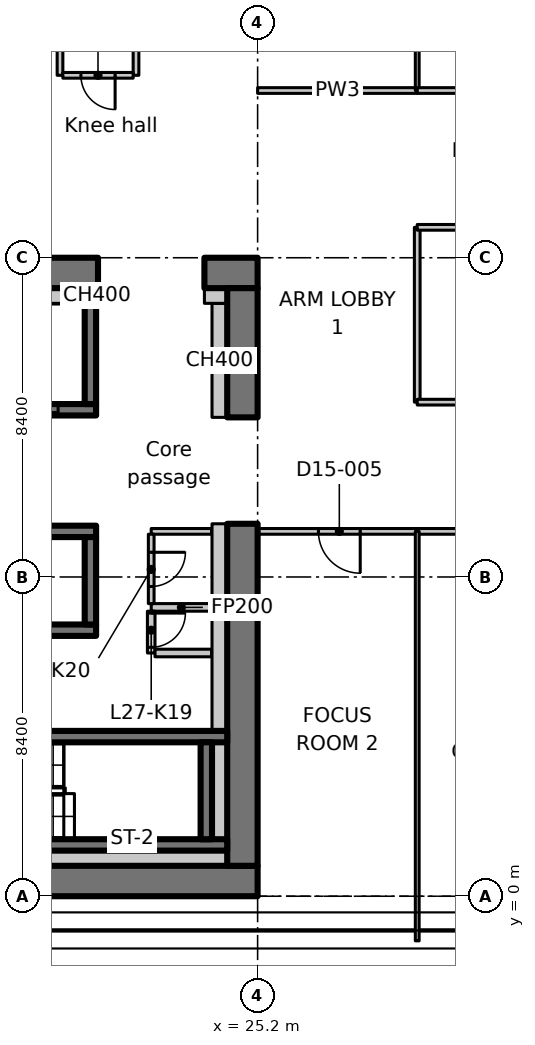
"""IFC4 building model, lengths in metres.
Left out: names, types, materials, properties, quantities, classifications, styles, units other than length and angle.
Written with IfcOpenShell. Run it as: python <this file> out.ifc"""

import sys

from ifc_helpers import new_model, si_unit, direction, frame, frame_2d, origin, place, context, subcontext, project, spatial, polyline, rectangle, outline, extrude, element, fill, save


model = new_model("IFC4")
c1 = context("Model", 3, precision=1e-05, world=origin(), true_north=direction((0.0, 1.0)))
c2 = subcontext(c1, "Body", "Model", "MODEL_VIEW")
j1 = project(units=[si_unit("LENGTHUNIT", "METRE"), si_unit("PLANEANGLEUNIT", "RADIAN")], contexts=[c1])
p1 = place(None, origin())
s1 = spatial("IfcSite", under=j1, at=p1, CompositionType="ELEMENT")
p2 = place(p1, origin())
s2 = spatial("IfcBuilding", under=s1, at=p2, CompositionType="ELEMENT")
p3 = place(p2, frame((0.0, 0.0, 113.3)))
s3 = spatial("IfcBuildingStorey", under=s2, at=p3, CompositionType="ELEMENT", Elevation=113.3)
p4 = place(p3, frame((7.136, 0.4, 0.0), z_axis=(0.0, 0.0, 1.0), x_axis=(1.0, 0.0, 0.0)))
e1 = element("IfcWall", 1, at=p4, inside=s3, PredefinedType="SHEAR", context=c2, shape_type="SweptSolid", body=[
    extrude(rectangle(XDim=18.063, YDim=0.8, at=frame_2d((9.032, 0.0))), origin(), (0.0, 0.0, 1.0), 3.35),
])
p5 = place(p3, frame((-1.1, 16.4, 0.0), z_axis=(0.0, 0.0, 1.0), x_axis=(1.0, 0.0, 0.0)))
e2 = element("IfcWall", 2, at=p5, inside=s3, PredefinedType="SHEAR", context=c2, shape_type="SweptSolid", body=[
    extrude(rectangle(XDim=22.1, YDim=0.8, at=frame_2d((11.05, 0.0))), origin(), (0.0, 0.0, 1.0), 3.35),
])
p6 = place(p5, frame((3.15, 0.0, 0.0)))
e3 = element("IfcOpeningElement", 3, at=p6, cuts=e2, PredefinedType="OPENING", context=c2, shape_type="SweptSolid", body=[
    extrude(rectangle(XDim=1.1, YDim=2.3, at=frame_2d((0.55, 1.15))), frame((0.0, 0.41, 0.0), z_axis=(0.0, -1.0, 0.0), x_axis=(1.0, 0.0, 0.0)), (0.0, 0.0, 1.0), 0.82),
])
p7 = place(p3, frame((23.8, 16.4, 0.0), z_axis=(0.0, 0.0, 1.0), x_axis=(1.0, 0.0, 0.0)))
e4 = element("IfcWall", 4, at=p7, inside=s3, PredefinedType="SHEAR", context=c2, shape_type="SweptSolid", body=[
    extrude(rectangle(XDim=1.4, YDim=0.8, at=frame_2d((0.7, 0.0))), origin(), (0.0, 0.0, 1.0), 3.35),
])
p8 = place(p3, frame((24.8, 0.8, 0.0), z_axis=(0.0, 0.0, 1.0), x_axis=(0.0, 1.0, 0.0)))
e5 = element("IfcWall", 5, at=p8, inside=s3, PredefinedType="SHEAR", context=c2, shape_type="SweptSolid", body=[
    extrude(rectangle(XDim=9.0, YDim=0.8, at=frame_2d((4.5, 0.0))), origin(), (0.0, 0.0, 1.0), 3.35),
])
p9 = place(p3, frame((24.8, 12.6, 0.0), z_axis=(0.0, 0.0, 1.0), x_axis=(0.0, 1.0, 0.0)))
e6 = element("IfcWall", 6, at=p9, inside=s3, PredefinedType="SHEAR", context=c2, shape_type="SweptSolid", body=[
    extrude(rectangle(XDim=3.4, YDim=0.8, at=frame_2d((1.7, 0.0))), origin(), (0.0, 0.0, 1.0), 3.35),
])
p10 = place(p3, frame((24.2, 12.6, 0.0), z_axis=(0.0, 0.0, 1.0), x_axis=(0.0, 1.0, 0.0)))
e7 = element("IfcWall", 7, at=p10, inside=s3, PredefinedType="PARTITIONING", context=c2, shape_type="SweptSolid", body=[
    extrude(rectangle(XDim=3.0, YDim=0.4, at=frame_2d((1.5, 0.0))), origin(), (0.0, 0.0, 1.0), 3.35),
])
p11 = place(p3, frame((23.8, 15.8, 0.0), z_axis=(0.0, 0.0, 1.0), x_axis=(1.0, 0.0, 0.0)))
e8 = element("IfcWall", 8, at=p11, inside=s3, PredefinedType="PARTITIONING", context=c2, shape_type="SweptSolid", body=[
    extrude(rectangle(XDim=0.6, YDim=0.4, at=frame_2d((0.3, 0.0))), origin(), (0.0, 0.0, 1.0), 3.35),
])
p12 = place(p3, frame((0.8, 7.0, 0.0), z_axis=(0.0, 0.0, 1.0), x_axis=(1.0, 0.0, 0.0)))
e9 = element("IfcWall", 9, at=p12, inside=s3, PredefinedType="SHEAR", context=c2, shape_type="SweptSolid", body=[
    extrude(rectangle(XDim=20.15, YDim=0.3, at=frame_2d((10.075, 0.0))), origin(), (0.0, 0.0, 1.0), 3.35),
])
p13 = place(p3, frame((0.8, 9.6, 0.0), z_axis=(0.0, 0.0, 1.0), x_axis=(1.0, 0.0, 0.0)))
e10 = element("IfcWall", 10, at=p13, inside=s3, PredefinedType="SHEAR", context=c2, shape_type="SweptSolid", body=[
    extrude(rectangle(XDim=20.15, YDim=0.3, at=frame_2d((10.075, 0.0))), origin(), (0.0, 0.0, 1.0), 3.35),
])
p14 = place(p13, frame((1.25, 0.0, 0.0)))
e11 = element("IfcOpeningElement", 11, at=p14, cuts=e10, PredefinedType="OPENING", context=c2, shape_type="SweptSolid", body=[
    extrude(rectangle(XDim=1.1, YDim=2.3, at=frame_2d((0.55, 1.15))), frame((0.0, 0.16, 0.0), z_axis=(0.0, -1.0, 0.0), x_axis=(1.0, 0.0, 0.0)), (0.0, 0.0, 1.0), 0.32),
])
p15 = place(p13, frame((4.05, 0.0, 0.0)))
e12 = element("IfcOpeningElement", 12, at=p15, cuts=e10, PredefinedType="OPENING", context=c2, shape_type="SweptSolid", body=[
    extrude(rectangle(XDim=1.1, YDim=2.3, at=frame_2d((0.55, 1.15))), frame((0.0, 0.16, 0.0), z_axis=(0.0, -1.0, 0.0), x_axis=(1.0, 0.0, 0.0)), (0.0, 0.0, 1.0), 0.32),
])
p16 = place(p13, frame((6.85, 0.0, 0.0)))
e13 = element("IfcOpeningElement", 13, at=p16, cuts=e10, PredefinedType="OPENING", context=c2, shape_type="SweptSolid", body=[
    extrude(rectangle(XDim=1.1, YDim=2.3, at=frame_2d((0.55, 1.15))), frame((0.0, 0.16, 0.0), z_axis=(0.0, -1.0, 0.0), x_axis=(1.0, 0.0, 0.0)), (0.0, 0.0, 1.0), 0.32),
])
p17 = place(p13, frame((9.65, 0.0, 0.0)))
e14 = element("IfcOpeningElement", 14, at=p17, cuts=e10, PredefinedType="OPENING", context=c2, shape_type="SweptSolid", body=[
    extrude(rectangle(XDim=1.1, YDim=2.3, at=frame_2d((0.55, 1.15))), frame((0.0, 0.16, 0.0), z_axis=(0.0, -1.0, 0.0), x_axis=(1.0, 0.0, 0.0)), (0.0, 0.0, 1.0), 0.32),
])
p18 = place(p13, frame((12.45, 0.0, 0.0)))
e15 = element("IfcOpeningElement", 15, at=p18, cuts=e10, PredefinedType="OPENING", context=c2, shape_type="SweptSolid", body=[
    extrude(rectangle(XDim=1.1, YDim=2.3, at=frame_2d((0.55, 1.15))), frame((0.0, 0.16, 0.0), z_axis=(0.0, -1.0, 0.0), x_axis=(1.0, 0.0, 0.0)), (0.0, 0.0, 1.0), 0.32),
])
p19 = place(p13, frame((15.25, 0.0, 0.0)))
e16 = element("IfcOpeningElement", 16, at=p19, cuts=e10, PredefinedType="OPENING", context=c2, shape_type="SweptSolid", body=[
    extrude(rectangle(XDim=1.1, YDim=2.3, at=frame_2d((0.55, 1.15))), frame((0.0, 0.16, 0.0), z_axis=(0.0, -1.0, 0.0), x_axis=(1.0, 0.0, 0.0)), (0.0, 0.0, 1.0), 0.32),
])
p20 = place(p3, frame((20.8, 7.15, 0.0), z_axis=(0.0, 0.0, 1.0), x_axis=(0.0, 1.0, 0.0)))
e17 = element("IfcWall", 17, at=p20, inside=s3, PredefinedType="SHEAR", context=c2, shape_type="SweptSolid", body=[
    extrude(rectangle(XDim=2.3, YDim=0.3, at=frame_2d((1.15, 0.0))), origin(), (0.0, 0.0, 1.0), 3.35),
])
p21 = place(p3, frame((15.05, 12.8, 0.0), z_axis=(0.0, 0.0, 1.0), x_axis=(1.0, 0.0, 0.0)))
e18 = element("IfcWall", 18, at=p21, inside=s3, PredefinedType="SHEAR", context=c2, shape_type="SweptSolid", body=[
    extrude(rectangle(XDim=5.9, YDim=0.3, at=frame_2d((2.95, 0.0))), origin(), (0.0, 0.0, 1.0), 3.35),
])
p22 = place(p21, frame((3.8, 0.0, 0.0)))
e19 = element("IfcOpeningElement", 19, at=p22, cuts=e18, PredefinedType="OPENING", context=c2, shape_type="SweptSolid", body=[
    extrude(rectangle(XDim=1.1, YDim=2.3, at=frame_2d((0.55, 1.15))), frame((0.0, 0.16, 0.0), z_axis=(0.0, -1.0, 0.0), x_axis=(1.0, 0.0, 0.0)), (0.0, 0.0, 1.0), 0.32),
])
p23 = place(p3, frame((20.8, 12.95, 0.0), z_axis=(0.0, 0.0, 1.0), x_axis=(0.0, 1.0, 0.0)))
e20 = element("IfcWall", 20, at=p23, inside=s3, PredefinedType="SHEAR", context=c2, shape_type="SweptSolid", body=[
    extrude(rectangle(XDim=3.05, YDim=0.3, at=frame_2d((1.525, 0.0))), origin(), (0.0, 0.0, 1.0), 3.35),
])
p24 = place(p3, frame((15.8, 1.35, 0.0), z_axis=(0.0, 0.0, 1.0), x_axis=(1.0, 0.0, 0.0)))
e21 = element("IfcWall", 21, at=p24, inside=s3, PredefinedType="SHEAR", context=c2, shape_type="SweptSolid", body=[
    extrude(rectangle(XDim=8.6, YDim=0.3, at=frame_2d((4.3, 0.0))), origin(), (0.0, 0.0, 1.0), 3.35),
])
p25 = place(p3, frame((15.8, 4.2, 0.0), z_axis=(0.0, 0.0, 1.0), x_axis=(1.0, 0.0, 0.0)))
e22 = element("IfcWall", 22, at=p25, inside=s3, PredefinedType="SHEAR", context=c2, shape_type="SweptSolid", body=[
    extrude(rectangle(XDim=8.6, YDim=0.3, at=frame_2d((4.3, 0.0))), origin(), (0.0, 0.0, 1.0), 3.35),
])
p26 = place(p25, frame((0.4, 0.0, 0.0)))
e23 = element("IfcOpeningElement", 23, at=p26, cuts=e22, PredefinedType="OPENING", context=c2, shape_type="SweptSolid", body=[
    extrude(rectangle(XDim=1.0, YDim=2.1, at=frame_2d((0.5, 1.05))), frame((0.0, 0.16, 0.0), z_axis=(0.0, -1.0, 0.0), x_axis=(1.0, 0.0, 0.0)), (0.0, 0.0, 1.0), 0.32),
])
p27 = place(p3, frame((23.85, 1.5, 0.0), z_axis=(0.0, 0.0, 1.0), x_axis=(0.0, 1.0, 0.0)))
e24 = element("IfcWall", 24, at=p27, inside=s3, PredefinedType="SHEAR", context=c2, shape_type="SweptSolid", body=[
    extrude(rectangle(XDim=2.55, YDim=0.3, at=frame_2d((1.275, 0.0))), origin(), (0.0, 0.0, 1.0), 3.35),
])
p28 = place(p3, frame((23.988, 7.6, 0.0), z_axis=(0.0, 0.0, 1.0), x_axis=(-1.0, 0.0, 0.0)))
e25 = element("IfcWall", 25, at=p28, inside=s3, PredefinedType="PARTITIONING", context=c2, shape_type="SweptSolid", body=[
    extrude(rectangle(XDim=1.588, YDim=0.2, at=frame_2d((0.794, 0.0))), origin(), (0.0, 0.0, 1.0), 3.35),
])
p29 = place(p3, frame((22.4, 7.5, 0.0), z_axis=(0.0, 0.0, 1.0), x_axis=(0.0, -1.0, 0.0)))
e26 = element("IfcWall", 26, at=p29, inside=s3, PredefinedType="PARTITIONING", context=c2, shape_type="SweptSolid", body=[
    extrude(rectangle(XDim=1.1, YDim=0.2, at=frame_2d((0.55, 0.0))), origin(), (0.0, 0.0, 1.0), 3.35),
])
p30 = place(p29, frame((0.05, 0.0, 0.0)))
e27 = element("IfcOpeningElement", 27, at=p30, cuts=e26, PredefinedType="OPENING", context=c2, shape_type="SweptSolid", body=[
    extrude(rectangle(XDim=0.9, YDim=2.1, at=frame_2d((0.45, 1.05))), frame((0.0, 0.11, 0.0), z_axis=(0.0, -1.0, 0.0), x_axis=(1.0, 0.0, 0.0)), (0.0, 0.0, 1.0), 0.22),
])
p31 = place(p3, frame((22.5, 6.4, 0.0), z_axis=(0.0, 0.0, 1.0), x_axis=(1.0, 0.0, 0.0)))
e28 = element("IfcWall", 28, at=p31, inside=s3, PredefinedType="PARTITIONING", context=c2, shape_type="SweptSolid", body=[
    extrude(rectangle(XDim=1.488, YDim=0.2, at=frame_2d((0.744, 0.0))), origin(), (0.0, 0.0, 1.0), 3.35),
])
p32 = place(p3, frame((23.988, 9.6, 0.0), z_axis=(0.0, 0.0, 1.0), x_axis=(-1.0, 0.0, 0.0)))
e29 = element("IfcWall", 29, at=p32, inside=s3, PredefinedType="PARTITIONING", context=c2, shape_type="SweptSolid", body=[
    extrude(rectangle(XDim=1.588, YDim=0.15, at=frame_2d((0.794, 0.0))), origin(), (0.0, 0.0, 1.0), 3.35),
])
p33 = place(p3, frame((22.4, 9.525, 0.0), z_axis=(0.0, 0.0, 1.0), x_axis=(0.0, -1.0, 0.0)))
e30 = element("IfcWall", 30, at=p33, inside=s3, PredefinedType="PARTITIONING", context=c2, shape_type="SweptSolid", body=[
    extrude(rectangle(XDim=1.825, YDim=0.15, at=frame_2d((0.913, 0.0))), origin(), (0.0, 0.0, 1.0), 3.35),
])
p34 = place(p33, frame((0.475, 0.0, 0.0)))
e31 = element("IfcOpeningElement", 31, at=p34, cuts=e30, PredefinedType="OPENING", context=c2, shape_type="SweptSolid", body=[
    extrude(rectangle(XDim=0.9, YDim=2.1, at=frame_2d((0.45, 1.05))), frame((0.0, 0.085, 0.0), z_axis=(0.0, -1.0, 0.0), x_axis=(1.0, 0.0, 0.0)), (0.0, 0.0, 1.0), 0.17),
])
p35 = place(p3, frame((20.0, 21.6, 0.0), z_axis=(0.0, 0.0, 1.0), x_axis=(0.0, 1.0, 0.0)))
e32 = element("IfcWall", 32, at=p35, inside=s3, PredefinedType="PARTITIONING", context=c2, shape_type="SweptSolid", body=[
    extrude(rectangle(XDim=2.4, YDim=0.15, at=frame_2d((1.2, 0.0))), origin(), (0.0, 0.0, 1.0), 3.35),
])
p36 = place(p3, frame((22.0, 23.925, 0.0), z_axis=(0.0, 0.0, 1.0), x_axis=(0.0, -1.0, 0.0)))
e33 = element("IfcWall", 33, at=p36, inside=s3, PredefinedType="PARTITIONING", context=c2, shape_type="SweptSolid", body=[
    extrude(rectangle(XDim=2.325, YDim=0.15, at=frame_2d((1.163, 0.0))), origin(), (0.0, 0.0, 1.0), 3.35),
])
p37 = place(p3, frame((21.925, 21.6, 0.0), z_axis=(0.0, 0.0, 1.0), x_axis=(-1.0, 0.0, 0.0)))
e34 = element("IfcWall", 34, at=p37, inside=s3, PredefinedType="PARTITIONING", context=c2, shape_type="SweptSolid", body=[
    extrude(rectangle(XDim=1.85, YDim=0.15, at=frame_2d((0.925, 0.0))), origin(), (0.0, 0.0, 1.0), 3.35),
])
p38 = place(p37, frame((0.475, 0.0, 0.0)))
e35 = element("IfcOpeningElement", 35, at=p38, cuts=e34, PredefinedType="OPENING", context=c2, shape_type="SweptSolid", body=[
    extrude(rectangle(XDim=0.9, YDim=2.1, at=frame_2d((0.45, 1.05))), frame((0.0, 0.085, 0.0), z_axis=(0.0, -1.0, 0.0), x_axis=(1.0, 0.0, 0.0)), (0.0, 0.0, 1.0), 0.17),
])
p39 = place(p3, frame((18.15, 15.8, 0.0), z_axis=(0.0, 0.0, 1.0), x_axis=(1.0, 0.0, 0.0)))
e36 = element("IfcWall", 36, at=p39, inside=s3, PredefinedType="PARTITIONING", context=c2, shape_type="SweptSolid", body=[
    extrude(rectangle(XDim=2.5, YDim=0.4, at=frame_2d((1.25, 0.0))), origin(), (0.0, 0.0, 1.0), 3.35),
])
p40 = place(p3, frame((20.95, 15.8, 0.0), z_axis=(0.0, 0.0, 1.0), x_axis=(1.0, 0.0, 0.0)))
e37 = element("IfcWall", 37, at=p40, inside=s3, PredefinedType="PARTITIONING", context=c2, shape_type="SweptSolid", body=[
    extrude(rectangle(XDim=0.05, YDim=0.4, at=frame_2d((0.025, 0.0))), origin(), (0.0, 0.0, 1.0), 3.35),
])
p41 = place(p3, frame((13.35, 1.0, 0.0), z_axis=(0.0, 0.0, 1.0), x_axis=(1.0, 0.0, 0.0)))
e38 = element("IfcWall", 38, at=p41, inside=s3, PredefinedType="PARTITIONING", context=c2, shape_type="SweptSolid", body=[
    extrude(rectangle(XDim=11.05, YDim=0.4, at=frame_2d((5.525, 0.0))), origin(), (0.0, 0.0, 1.0), 3.35),
])
p42 = place(p3, frame((24.2, 1.5, 0.0), z_axis=(0.0, 0.0, 1.0), x_axis=(0.0, 1.0, 0.0)))
e39 = element("IfcWall", 39, at=p42, inside=s3, PredefinedType="PARTITIONING", context=c2, shape_type="SweptSolid", body=[
    extrude(rectangle(XDim=2.55, YDim=0.4, at=frame_2d((1.275, 0.0))), origin(), (0.0, 0.0, 1.0), 3.35),
])
p43 = place(p3, frame((24.2, 4.35, 0.0), z_axis=(0.0, 0.0, 1.0), x_axis=(0.0, 1.0, 0.0)))
e40 = element("IfcWall", 40, at=p43, inside=s3, PredefinedType="PARTITIONING", context=c2, shape_type="SweptSolid", body=[
    extrude(rectangle(XDim=5.45, YDim=0.4, at=frame_2d((2.725, 0.0))), origin(), (0.0, 0.0, 1.0), 3.35),
])
p44 = place(p3, frame((25.2, 21.2, 0.0), z_axis=(0.0, 0.0, 1.0), x_axis=(1.0, 0.0, 0.0)))
e41 = element("IfcWall", 41, at=p44, inside=s3, PredefinedType="PARTITIONING", context=c2, shape_type="SweptSolid", body=[
    extrude(rectangle(XDim=4.2, YDim=0.15, at=frame_2d((2.1, 0.0))), origin(), (0.0, 0.0, 1.0), 3.33),
])
p45 = place(p3, frame((29.4, 17.6, 0.0), z_axis=(0.0, 0.0, 1.0), x_axis=(0.0, -1.0, 0.0)))
e42 = element("IfcWall", 42, at=p45, inside=s3, PredefinedType="PARTITIONING", context=c2, shape_type="SweptSolid", body=[
    extrude(rectangle(XDim=4.6, YDim=0.15, at=frame_2d((2.3, 0.0))), origin(), (0.0, 0.0, 1.0), 3.33),
])
p46 = place(p3, frame((29.4, 9.6, 0.0), z_axis=(0.0, 0.0, 1.0), x_axis=(-1.0, 0.0, 0.0)))
e43 = element("IfcWall", 43, at=p46, inside=s3, PredefinedType="PARTITIONING", context=c2, shape_type="SweptSolid", body=[
    extrude(rectangle(XDim=4.2, YDim=0.15, at=frame_2d((2.1, 0.0))), origin(), (0.0, 0.0, 1.0), 3.33),
])
p47 = place(p46, frame((1.5, 0.0, 0.0)))
e44 = element("IfcOpeningElement", 44, at=p47, cuts=e43, PredefinedType="OPENING", context=c2, shape_type="SweptSolid", body=[
    extrude(rectangle(XDim=1.1, YDim=2.1, at=frame_2d((0.55, 1.05))), frame((0.0, 0.085, 0.0), z_axis=(0.0, -1.0, 0.0), x_axis=(1.0, 0.0, 0.0)), (0.0, 0.0, 1.0), 0.17),
])
p48 = place(p3, frame((29.4, 27.511, 0.0), z_axis=(0.0, 0.0, 1.0), x_axis=(0.0, -1.0, 0.0)))
e45 = element("IfcWall", 45, at=p48, inside=s3, PredefinedType="PARTITIONING", context=c2, shape_type="SweptSolid", body=[
    extrude(outline(polyline([(0.0, 0.0), (6.311, 0.0), (6.311, 3.33), (2.761, 3.33), (2.759, 2.98), (1.863, 2.98), (1.861, 3.33), (0.236, 3.33), (0.0, 3.33), (0.0, 0.0)])), frame((0.0, 0.05, 0.0), z_axis=(0.0, -1.0, 0.0), x_axis=(1.0, 0.0, 0.0)), (0.0, 0.0, 1.0), 0.1),
])
p49 = place(p3, frame((29.4, 13.0, 0.0), z_axis=(0.0, 0.0, 1.0), x_axis=(1.0, 0.0, 0.0)))
e46 = element("IfcWall", 46, at=p49, inside=s3, PredefinedType="PARTITIONING", context=c2, shape_type="SweptSolid", body=[
    extrude(rectangle(XDim=11.8, YDim=0.15, at=frame_2d((5.9, 0.0))), origin(), (0.0, 0.0, 1.0), 3.33),
])
p50 = place(p3, frame((33.6, 9.6, 0.0), z_axis=(0.0, 0.0, 1.0), x_axis=(-1.0, 0.0, 0.0)))
e47 = element("IfcWall", 47, at=p50, inside=s3, PredefinedType="PARTITIONING", context=c2, shape_type="SweptSolid", body=[
    extrude(rectangle(XDim=4.2, YDim=0.15, at=frame_2d((2.1, 0.0))), origin(), (0.0, 0.0, 1.0), 3.33),
])
p51 = place(p50, frame((1.5, 0.0, 0.0)))
e48 = element("IfcOpeningElement", 48, at=p51, cuts=e47, PredefinedType="OPENING", context=c2, shape_type="SweptSolid", body=[
    extrude(rectangle(XDim=1.1, YDim=2.1, at=frame_2d((0.55, 1.05))), frame((0.0, 0.085, 0.0), z_axis=(0.0, -1.0, 0.0), x_axis=(1.0, 0.0, 0.0)), (0.0, 0.0, 1.0), 0.17),
])
p52 = place(p3, frame((41.2, 17.6, 0.0), z_axis=(0.0, 0.0, 1.0), x_axis=(-1.0, 0.0, 0.0)))
e49 = element("IfcWall", 49, at=p52, inside=s3, PredefinedType="PARTITIONING", context=c2, shape_type="SweptSolid", body=[
    extrude(rectangle(XDim=11.8, YDim=0.15, at=frame_2d((5.9, 0.0))), origin(), (0.0, 0.0, 1.0), 3.33),
])
p53 = place(p52, frame((5.4, 0.0, 0.0)))
e50 = element("IfcOpeningElement", 50, at=p53, cuts=e49, PredefinedType="OPENING", context=c2, shape_type="SweptSolid", body=[
    extrude(rectangle(XDim=1.1, YDim=2.1, at=frame_2d((0.55, 1.05))), frame((0.0, 0.085, 0.0), z_axis=(0.0, -1.0, 0.0), x_axis=(1.0, 0.0, 0.0)), (0.0, 0.0, 1.0), 0.17),
])
p54 = place(p3, frame((29.4, 21.2, 0.0), z_axis=(0.0, 0.0, 1.0), x_axis=(1.0, 0.0, 0.0)))
e51 = element("IfcWall", 51, at=p54, inside=s3, PredefinedType="PARTITIONING", context=c2, shape_type="SweptSolid", body=[
    extrude(rectangle(XDim=4.2, YDim=0.15, at=frame_2d((2.1, 0.0))), origin(), (0.0, 0.0, 1.0), 3.33),
])
p55 = place(p54, frame((1.5, 0.0, 0.0)))
e52 = element("IfcOpeningElement", 52, at=p55, cuts=e51, PredefinedType="OPENING", context=c2, shape_type="SweptSolid", body=[
    extrude(rectangle(XDim=1.1, YDim=2.1, at=frame_2d((0.55, 1.05))), frame((0.0, 0.085, 0.0), z_axis=(0.0, -1.0, 0.0), x_axis=(1.0, 0.0, 0.0)), (0.0, 0.0, 1.0), 0.17),
])
p56 = place(p3, frame((29.4, 9.6, 0.0), z_axis=(0.0, 0.0, 1.0), x_axis=(0.0, -1.0, 0.0)))
e53 = element("IfcWall", 53, at=p56, inside=s3, PredefinedType="PARTITIONING", context=c2, shape_type="SweptSolid", body=[
    extrude(outline(polyline([(0.0, 0.0), (10.774, 0.0), (10.774, 3.33), (10.7, 3.33), (10.05, 3.33), (10.048, 2.98), (9.152, 2.98), (9.15, 3.33), (0.0, 3.33), (0.0, 0.0)])), frame((0.0, 0.05, 0.0), z_axis=(0.0, -1.0, 0.0), x_axis=(1.0, 0.0, 0.0)), (0.0, 0.0, 1.0), 0.1),
])
p57 = place(p22, origin())
e54 = element("IfcDoor", 54, at=p57, inside=s3, OperationType="SLIDING_TO_LEFT", PredefinedType="DOOR", context=c2, shape_type="SweptSolid", body=[
    extrude(rectangle(XDim=1.1, YDim=2.3, at=frame_2d((0.55, 1.15))), frame((0.0, 0.025, 0.0), z_axis=(0.0, -1.0, 0.0), x_axis=(1.0, 0.0, 0.0)), (0.0, 0.0, 1.0), 0.05),
])
fill(e19, e54)
p58 = place(p30, origin())
e55 = element("IfcDoor", 55, at=p58, inside=s3, OperationType="SINGLE_SWING_RIGHT", PredefinedType="DOOR", context=c2, shape_type="SweptSolid", body=[
    extrude(rectangle(XDim=0.9, YDim=2.1, at=frame_2d((0.45, 1.05))), frame((0.0, 0.025, 0.0), z_axis=(0.0, -1.0, 0.0), x_axis=(1.0, 0.0, 0.0)), (0.0, 0.0, 1.0), 0.05),
])
fill(e27, e55)
p59 = place(p34, origin())
e56 = element("IfcDoor", 56, at=p59, inside=s3, OperationType="SINGLE_SWING_LEFT", PredefinedType="DOOR", context=c2, shape_type="SweptSolid", body=[
    extrude(rectangle(XDim=0.9, YDim=2.1, at=frame_2d((0.45, 1.05))), frame((0.0, 0.025, 0.0), z_axis=(0.0, -1.0, 0.0), x_axis=(1.0, 0.0, 0.0)), (0.0, 0.0, 1.0), 0.05),
])
fill(e31, e56)
p60 = place(p38, origin())
e57 = element("IfcDoor", 57, at=p60, inside=s3, OperationType="SINGLE_SWING_LEFT", PredefinedType="DOOR", context=c2, shape_type="SweptSolid", body=[
    extrude(rectangle(XDim=0.9, YDim=2.1, at=frame_2d((0.45, 1.05))), frame((0.0, 0.025, 0.0), z_axis=(0.0, -1.0, 0.0), x_axis=(1.0, 0.0, 0.0)), (0.0, 0.0, 1.0), 0.05),
])
fill(e35, e57)
p61 = place(p47, origin())
e58 = element("IfcDoor", 58, at=p61, inside=s3, OperationType="SINGLE_SWING_LEFT", PredefinedType="DOOR", context=c2, shape_type="SweptSolid", body=[
    extrude(rectangle(XDim=1.1, YDim=2.1, at=frame_2d((0.55, 1.05))), frame((0.0, 0.025, 0.0), z_axis=(0.0, -1.0, 0.0), x_axis=(1.0, 0.0, 0.0)), (0.0, 0.0, 1.0), 0.05),
])
fill(e44, e58)
save(model, sys.argv[1])
